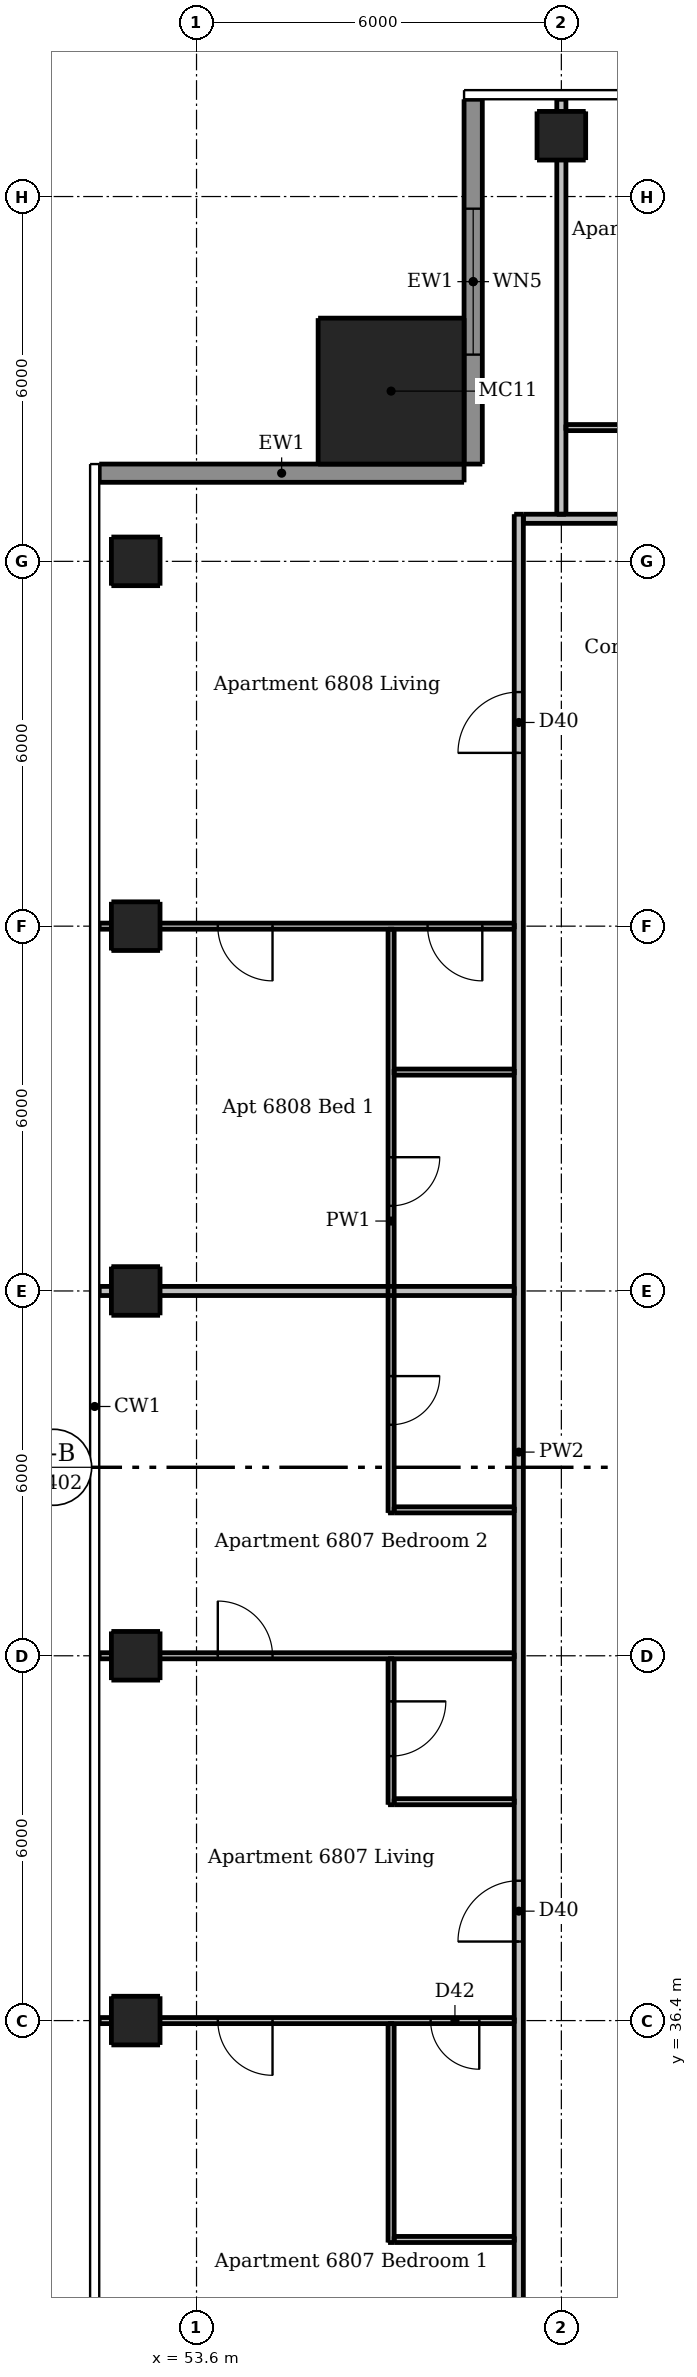
"""IFC4 building model, lengths in metres.
Left out: names, types, materials, properties, quantities, classifications, styles, units other than length and angle.
Written with IfcOpenShell. Run it as: python <this file> out.ifc"""

import sys

from ifc_helpers import new_model, si_unit, direction, frame, frame_2d, origin, origin_2d, place, context, subcontext, project, spatial, rectangle, extrude, element, fill, save


model = new_model("IFC4")
c1 = context("Model", 3, precision=1e-05, world=origin(), true_north=direction((0.0, 1.0)))
c2 = subcontext(c1, "Body", "Model", "MODEL_VIEW")
j1 = project(units=[si_unit("LENGTHUNIT", "METRE"), si_unit("PLANEANGLEUNIT", "RADIAN")], contexts=[c1])
p1 = place(None, origin())
s1 = spatial("IfcSite", under=j1, at=p1, CompositionType="ELEMENT")
p2 = place(p1, origin())
s2 = spatial("IfcBuilding", under=s1, at=p2, CompositionType="ELEMENT")
p3 = place(p2, frame((0.0, 0.0, 255.4)))
s3 = spatial("IfcBuildingStorey", under=s2, at=p3, CompositionType="ELEMENT", Elevation=255.4)
for number, where, z_axis, x_axis in (
    (1, (59.6, 67.4, 0.0), (0.0, 0.0, 1.0), (1.0, 0.0, 0.0)),
    (2, (52.6, 36.4, 0.0), (0.0, 0.0, 1.0), (1.0, 0.0, 0.0)),
    (3, (52.6, 42.4, 0.0), (0.0, 0.0, 1.0), (1.0, 0.0, 0.0)),
    (4, (52.6, 48.4, 0.0), (0.0, 0.0, 1.0), (1.0, 0.0, 0.0)),
    (5, (52.6, 54.4, 0.0), (0.0, 0.0, 1.0), (1.0, 0.0, 0.0)),
    (6, (52.6, 60.4, 0.0), (0.0, 0.0, 1.0), (1.0, 0.0, 0.0)),
):
    element("IfcColumn", number, at=place(p3, frame(where, z_axis=z_axis, x_axis=x_axis)), inside=s3, PredefinedType="COLUMN", context=c2, shape_type="SweptSolid", body=[
        extrude(rectangle(XDim=0.8, YDim=0.8, at=origin_2d()), origin(), (0.0, 0.0, 1.0), 3.05),
    ])
p4 = place(p3, frame((56.8, 63.2, 0.0), z_axis=(0.0, 0.0, 1.0), x_axis=(1.0, 0.0, 0.0)))
e7 = element("IfcColumn", 7, at=p4, inside=s3, PredefinedType="COLUMN", context=c2, shape_type="SweptSolid", body=[
    extrude(rectangle(XDim=2.4, YDim=2.4, at=origin_2d()), origin(), (0.0, 0.0, 1.0), 3.3),
])
p5 = place(p3, frame((58.15, 68.0, 0.0), z_axis=(0.0, 0.0, 1.0), x_axis=(0.0, -1.0, 0.0)))
e8 = element("IfcWall", 8, at=p5, inside=s3, PredefinedType="SOLIDWALL", context=c2, shape_type="SweptSolid", body=[
    extrude(rectangle(XDim=6.0, YDim=0.3, at=frame_2d((3.0, 0.0))), origin(), (0.0, 0.0, 1.0), 3.05),
])
p6 = place(p5, frame((1.8, 0.0, 0.15)))
e9 = element("IfcOpeningElement", 9, at=p6, cuts=e8, PredefinedType="OPENING", context=c2, shape_type="SweptSolid", body=[
    extrude(rectangle(XDim=2.4, YDim=2.1, at=frame_2d((1.2, 1.05))), frame((0.0, 0.16, 0.0), z_axis=(0.0, -1.0, 0.0), x_axis=(1.0, 0.0, 0.0)), (0.0, 0.0, 1.0), 0.32),
])
p7 = place(p3, frame((58.0, 61.85, 0.0), z_axis=(0.0, 0.0, 1.0), x_axis=(-1.0, 0.0, 0.0)))
e10 = element("IfcWall", 10, at=p7, inside=s3, PredefinedType="SOLIDWALL", context=c2, shape_type="SweptSolid", body=[
    extrude(rectangle(XDim=6.0, YDim=0.3, at=frame_2d((3.0, 0.0))), origin(), (0.0, 0.0, 1.0), 3.05),
])
p8 = place(p3, frame((56.8, 32.75, 0.0), z_axis=(0.0, 0.0, 1.0), x_axis=(0.0, 1.0, 0.0)))
e11 = element("IfcWall", 11, at=p8, inside=s3, PredefinedType="PARTITIONING", context=c2, shape_type="SweptSolid", body=[
    extrude(rectangle(XDim=3.6, YDim=0.1, at=frame_2d((1.8, 0.0))), origin(), (0.0, 0.0, 1.0), 3.05),
])
p9 = place(p3, frame((56.8, 42.35, 0.0), z_axis=(0.0, 0.0, 1.0), x_axis=(0.0, -1.0, 0.0)))
e12 = element("IfcWall", 12, at=p9, inside=s3, PredefinedType="PARTITIONING", context=c2, shape_type="SweptSolid", body=[
    extrude(rectangle(XDim=2.4, YDim=0.1, at=frame_2d((1.2, 0.0))), origin(), (0.0, 0.0, 1.0), 3.05),
])
p10 = place(p9, frame((0.7, 0.0, 0.0)))
e13 = element("IfcOpeningElement", 13, at=p10, cuts=e12, PredefinedType="OPENING", context=c2, shape_type="SweptSolid", body=[
    extrude(rectangle(XDim=0.9, YDim=2.1, at=frame_2d((0.45, 1.05))), frame((0.0, 0.06, 0.0), z_axis=(0.0, -1.0, 0.0), x_axis=(1.0, 0.0, 0.0)), (0.0, 0.0, 1.0), 0.12),
])
p11 = place(p3, frame((56.8, 54.35, 0.0), z_axis=(0.0, 0.0, 1.0), x_axis=(0.0, -1.0, 0.0)))
e14 = element("IfcWall", 14, at=p11, inside=s3, PredefinedType="PARTITIONING", context=c2, shape_type="SweptSolid", body=[
    extrude(rectangle(XDim=9.6, YDim=0.1, at=frame_2d((4.8, 0.0))), origin(), (0.0, 0.0, 1.0), 3.05),
])
p12 = place(p11, frame((7.35, 0.0, 0.0)))
e15 = element("IfcOpeningElement", 15, at=p12, cuts=e14, PredefinedType="OPENING", context=c2, shape_type="SweptSolid", body=[
    extrude(rectangle(XDim=0.8, YDim=2.1, at=frame_2d((0.4, 1.05))), frame((0.0, 0.06, 0.0), z_axis=(0.0, -1.0, 0.0), x_axis=(1.0, 0.0, 0.0)), (0.0, 0.0, 1.0), 0.12),
])
p13 = place(p11, frame((3.75, 0.0, 0.0)))
e16 = element("IfcOpeningElement", 16, at=p13, cuts=e14, PredefinedType="OPENING", context=c2, shape_type="SweptSolid", body=[
    extrude(rectangle(XDim=0.8, YDim=2.1, at=frame_2d((0.4, 1.05))), frame((0.0, 0.06, 0.0), z_axis=(0.0, -1.0, 0.0), x_axis=(1.0, 0.0, 0.0)), (0.0, 0.0, 1.0), 0.12),
])
p14 = place(p3, frame((59.675, 62.6, 0.0), z_axis=(0.0, 0.0, 1.0), x_axis=(1.0, 0.0, 0.0)))
e17 = element("IfcWall", 17, at=p14, inside=s3, PredefinedType="PARTITIONING", context=c2, shape_type="SweptSolid", body=[
    extrude(rectangle(XDim=17.85, YDim=0.1, at=frame_2d((8.925, 0.0))), origin(), (0.0, 0.0, 1.0), 3.05),
])
p15 = place(p14, frame((12.375, 0.0, 0.0)))
e18 = element("IfcOpeningElement", 18, at=p15, cuts=e17, PredefinedType="OPENING", context=c2, shape_type="SweptSolid", body=[
    extrude(rectangle(XDim=0.9, YDim=2.1, at=frame_2d((0.45, 1.05))), frame((0.0, 0.06, 0.0), z_axis=(0.0, -1.0, 0.0), x_axis=(1.0, 0.0, 0.0)), (0.0, 0.0, 1.0), 0.12),
])
p16 = place(p14, frame((16.275, 0.0, 0.0)))
e19 = element("IfcOpeningElement", 19, at=p16, cuts=e17, PredefinedType="OPENING", context=c2, shape_type="SweptSolid", body=[
    extrude(rectangle(XDim=0.9, YDim=2.1, at=frame_2d((0.45, 1.05))), frame((0.0, 0.06, 0.0), z_axis=(0.0, -1.0, 0.0), x_axis=(1.0, 0.0, 0.0)), (0.0, 0.0, 1.0), 0.12),
])
p17 = place(p14, frame((14.175, 0.0, 0.0)))
e20 = element("IfcOpeningElement", 20, at=p17, cuts=e17, PredefinedType="OPENING", context=c2, shape_type="SweptSolid", body=[
    extrude(rectangle(XDim=0.9, YDim=2.1, at=frame_2d((0.45, 1.05))), frame((0.0, 0.06, 0.0), z_axis=(0.0, -1.0, 0.0), x_axis=(1.0, 0.0, 0.0)), (0.0, 0.0, 1.0), 0.12),
])
p18 = place(p14, frame((1.275, 0.0, 0.0)))
e21 = element("IfcOpeningElement", 21, at=p18, cuts=e17, PredefinedType="OPENING", context=c2, shape_type="SweptSolid", body=[
    extrude(rectangle(XDim=0.9, YDim=2.1, at=frame_2d((0.45, 1.05))), frame((0.0, 0.06, 0.0), z_axis=(0.0, -1.0, 0.0), x_axis=(1.0, 0.0, 0.0)), (0.0, 0.0, 1.0), 0.12),
])
p19 = place(p14, frame((7.275, 0.0, 0.0)))
e22 = element("IfcOpeningElement", 22, at=p19, cuts=e17, PredefinedType="OPENING", context=c2, shape_type="SweptSolid", body=[
    extrude(rectangle(XDim=0.9, YDim=2.1, at=frame_2d((0.45, 1.05))), frame((0.0, 0.06, 0.0), z_axis=(0.0, -1.0, 0.0), x_axis=(1.0, 0.0, 0.0)), (0.0, 0.0, 1.0), 0.12),
])
p20 = place(p14, frame((4.325, 0.0, 0.0)))
e23 = element("IfcOpeningElement", 23, at=p20, cuts=e17, PredefinedType="OPENING", context=c2, shape_type="SweptSolid", body=[
    extrude(rectangle(XDim=0.8, YDim=2.1, at=frame_2d((0.4, 1.05))), frame((0.0, 0.06, 0.0), z_axis=(0.0, -1.0, 0.0), x_axis=(1.0, 0.0, 0.0)), (0.0, 0.0, 1.0), 0.12),
])
p21 = place(p14, frame((10.325, 0.0, 0.0)))
e24 = element("IfcOpeningElement", 24, at=p21, cuts=e17, PredefinedType="OPENING", context=c2, shape_type="SweptSolid", body=[
    extrude(rectangle(XDim=0.8, YDim=2.1, at=frame_2d((0.4, 1.05))), frame((0.0, 0.06, 0.0), z_axis=(0.0, -1.0, 0.0), x_axis=(1.0, 0.0, 0.0)), (0.0, 0.0, 1.0), 0.12),
])
p22 = place(p3, frame((58.825, 54.4, 0.0), z_axis=(0.0, 0.0, 1.0), x_axis=(-1.0, 0.0, 0.0)))
e25 = element("IfcWall", 25, at=p22, inside=s3, PredefinedType="PARTITIONING", context=c2, shape_type="SweptSolid", body=[
    extrude(rectangle(XDim=6.825, YDim=0.1, at=frame_2d((3.413, 0.0))), origin(), (0.0, 0.0, 1.0), 2.516),
])
p23 = place(p22, frame((0.525, 0.0, 0.0)))
e26 = element("IfcOpeningElement", 26, at=p23, cuts=e25, PredefinedType="OPENING", context=c2, shape_type="SweptSolid", body=[
    extrude(rectangle(XDim=0.9, YDim=2.1, at=frame_2d((0.45, 1.05))), frame((0.0, 0.06, 0.0), z_axis=(0.0, -1.0, 0.0), x_axis=(1.0, 0.0, 0.0)), (0.0, 0.0, 1.0), 0.12),
])
p24 = place(p22, frame((3.975, 0.0, 0.0)))
e27 = element("IfcOpeningElement", 27, at=p24, cuts=e25, PredefinedType="OPENING", context=c2, shape_type="SweptSolid", body=[
    extrude(rectangle(XDim=0.9, YDim=2.1, at=frame_2d((0.45, 1.05))), frame((0.0, 0.06, 0.0), z_axis=(0.0, -1.0, 0.0), x_axis=(1.0, 0.0, 0.0)), (0.0, 0.0, 1.0), 0.12),
])
for number, where, z_axis, x_axis in (
    (28, (56.85, 52.0, 0.0), (0.0, 0.0, 1.0), (1.0, 0.0, 0.0)),
    (29, (56.85, 44.8, 0.0), (0.0, 0.0, 1.0), (1.0, 0.0, 0.0)),
):
    element("IfcWall", number, at=place(p3, frame(where, z_axis=z_axis, x_axis=x_axis)), inside=s3, PredefinedType="PARTITIONING", context=c2, shape_type="SweptSolid", body=[
        extrude(rectangle(XDim=1.975, YDim=0.1, at=frame_2d((0.987, 0.0))), origin(), (0.0, 0.0, 1.0), 3.05),
    ])
p25 = place(p3, frame((52.0, 42.4, 0.0), z_axis=(0.0, 0.0, 1.0), x_axis=(1.0, 0.0, 0.0)))
e30 = element("IfcWall", 30, at=p25, inside=s3, PredefinedType="PARTITIONING", context=c2, shape_type="SweptSolid", body=[
    extrude(rectangle(XDim=6.825, YDim=0.1, at=frame_2d((3.413, 0.0))), origin(), (0.0, 0.0, 1.0), 2.516),
])
p26 = place(p25, frame((1.95, 0.0, 0.0)))
e31 = element("IfcOpeningElement", 31, at=p26, cuts=e30, PredefinedType="OPENING", context=c2, shape_type="SweptSolid", body=[
    extrude(rectangle(XDim=0.9, YDim=2.1, at=frame_2d((0.45, 1.05))), frame((0.0, 0.06, 0.0), z_axis=(0.0, -1.0, 0.0), x_axis=(1.0, 0.0, 0.0)), (0.0, 0.0, 1.0), 0.12),
])
p27 = place(p3, frame((56.85, 40.0, 0.0), z_axis=(0.0, 0.0, 1.0), x_axis=(1.0, 0.0, 0.0)))
e32 = element("IfcWall", 32, at=p27, inside=s3, PredefinedType="PARTITIONING", context=c2, shape_type="SweptSolid", body=[
    extrude(rectangle(XDim=1.975, YDim=0.1, at=frame_2d((0.987, 0.0))), origin(), (0.0, 0.0, 1.0), 3.05),
])
p28 = place(p3, frame((58.825, 36.4, 0.0), z_axis=(0.0, 0.0, 1.0), x_axis=(-1.0, 0.0, 0.0)))
e33 = element("IfcWall", 33, at=p28, inside=s3, PredefinedType="PARTITIONING", context=c2, shape_type="SweptSolid", body=[
    extrude(rectangle(XDim=6.825, YDim=0.1, at=frame_2d((3.413, 0.0))), origin(), (0.0, 0.0, 1.0), 2.516),
])
p29 = place(p28, frame((3.975, 0.0, 0.0)))
e34 = element("IfcOpeningElement", 34, at=p29, cuts=e33, PredefinedType="OPENING", context=c2, shape_type="SweptSolid", body=[
    extrude(rectangle(XDim=0.9, YDim=2.1, at=frame_2d((0.45, 1.05))), frame((0.0, 0.06, 0.0), z_axis=(0.0, -1.0, 0.0), x_axis=(1.0, 0.0, 0.0)), (0.0, 0.0, 1.0), 0.12),
])
p30 = place(p28, frame((0.575, 0.0, 0.0)))
e35 = element("IfcOpeningElement", 35, at=p30, cuts=e33, PredefinedType="OPENING", context=c2, shape_type="SweptSolid", body=[
    extrude(rectangle(XDim=0.8, YDim=2.1, at=frame_2d((0.4, 1.05))), frame((0.0, 0.06, 0.0), z_axis=(0.0, -1.0, 0.0), x_axis=(1.0, 0.0, 0.0)), (0.0, 0.0, 1.0), 0.12),
])
p31 = place(p3, frame((56.85, 32.8, 0.0), z_axis=(0.0, 0.0, 1.0), x_axis=(1.0, 0.0, 0.0)))
e36 = element("IfcWall", 36, at=p31, inside=s3, PredefinedType="PARTITIONING", context=c2, shape_type="SweptSolid", body=[
    extrude(rectangle(XDim=1.975, YDim=0.1, at=frame_2d((0.987, 0.0))), origin(), (0.0, 0.0, 1.0), 3.05),
])
p32 = place(p3, frame((58.9, 30.325, 0.0), z_axis=(0.0, 0.0, 1.0), x_axis=(0.0, 1.0, 0.0)))
e37 = element("IfcWall", 37, at=p32, inside=s3, PredefinedType="PARTITIONING", context=c2, shape_type="SweptSolid", body=[
    extrude(rectangle(XDim=30.85, YDim=0.15, at=frame_2d((15.425, 0.0))), origin(), (0.0, 0.0, 1.0), 3.05),
])
p33 = place(p32, frame((7.375, 0.0, 0.0)))
e38 = element("IfcOpeningElement", 38, at=p33, cuts=e37, PredefinedType="OPENING", context=c2, shape_type="SweptSolid", body=[
    extrude(rectangle(XDim=1.0, YDim=2.1, at=frame_2d((0.5, 1.05))), frame((0.0, 0.085, 0.0), z_axis=(0.0, -1.0, 0.0), x_axis=(1.0, 0.0, 0.0)), (0.0, 0.0, 1.0), 0.17),
])
p34 = place(p32, frame((26.925, 0.0, 0.0)))
e39 = element("IfcOpeningElement", 39, at=p34, cuts=e37, PredefinedType="OPENING", context=c2, shape_type="SweptSolid", body=[
    extrude(rectangle(XDim=1.0, YDim=2.1, at=frame_2d((0.5, 1.05))), frame((0.0, 0.085, 0.0), z_axis=(0.0, -1.0, 0.0), x_axis=(1.0, 0.0, 0.0)), (0.0, 0.0, 1.0), 0.17),
])
p35 = place(p3, frame((59.6, 61.175, 0.0), z_axis=(0.0, 0.0, 1.0), x_axis=(0.0, 1.0, 0.0)))
e40 = element("IfcWall", 40, at=p35, inside=s3, PredefinedType="PARTITIONING", context=c2, shape_type="SweptSolid", body=[
    extrude(rectangle(XDim=6.825, YDim=0.15, at=frame_2d((3.413, 0.0))), origin(), (0.0, 0.0, 1.0), 2.51),
])
p36 = place(p3, frame((58.975, 61.1, 0.0), z_axis=(0.0, 0.0, 1.0), x_axis=(1.0, 0.0, 0.0)))
e41 = element("IfcWall", 41, at=p36, inside=s3, PredefinedType="PARTITIONING", context=c2, shape_type="SweptSolid", body=[
    extrude(rectangle(XDim=29.25, YDim=0.15, at=frame_2d((14.625, 0.0))), origin(), (0.0, 0.0, 1.0), 3.05),
])
p37 = place(p36, frame((9.125, 0.0, 0.0)))
e42 = element("IfcOpeningElement", 42, at=p37, cuts=e41, PredefinedType="OPENING", context=c2, shape_type="SweptSolid", body=[
    extrude(rectangle(XDim=1.0, YDim=2.1, at=frame_2d((0.5, 1.05))), frame((0.0, 0.085, 0.0), z_axis=(0.0, -1.0, 0.0), x_axis=(1.0, 0.0, 0.0)), (0.0, 0.0, 1.0), 0.17),
])
p38 = place(p36, frame((26.475, 0.0, 0.0)))
e43 = element("IfcOpeningElement", 43, at=p38, cuts=e41, PredefinedType="OPENING", context=c2, shape_type="SweptSolid", body=[
    extrude(rectangle(XDim=1.0, YDim=2.1, at=frame_2d((0.5, 1.05))), frame((0.0, 0.085, 0.0), z_axis=(0.0, -1.0, 0.0), x_axis=(1.0, 0.0, 0.0)), (0.0, 0.0, 1.0), 0.17),
])
p39 = place(p3, frame((52.0, 48.4, 0.0), z_axis=(0.0, 0.0, 1.0), x_axis=(1.0, 0.0, 0.0)))
e44 = element("IfcWall", 44, at=p39, inside=s3, PredefinedType="PARTITIONING", context=c2, shape_type="SweptSolid", body=[
    extrude(rectangle(XDim=6.825, YDim=0.15, at=frame_2d((3.413, 0.0))), origin(), (0.0, 0.0, 1.0), 2.516),
])
p40 = place(p6, origin())
e45 = element("IfcWindow", 45, at=p40, inside=s3, PartitioningType="DOUBLE_PANEL_VERTICAL", PredefinedType="WINDOW", context=c2, shape_type="SweptSolid", body=[
    extrude(rectangle(XDim=2.4, YDim=2.1, at=frame_2d((1.2, 1.05))), frame((0.0, 0.03, 0.0), z_axis=(0.0, -1.0, 0.0), x_axis=(1.0, 0.0, 0.0)), (0.0, 0.0, 1.0), 0.06),
])
fill(e9, e45)
p41 = place(p33, origin())
e46 = element("IfcDoor", 46, at=p41, inside=s3, OperationType="SINGLE_SWING_LEFT", PredefinedType="DOOR", context=c2, shape_type="SweptSolid", body=[
    extrude(rectangle(XDim=1.0, YDim=2.1, at=frame_2d((0.5, 1.05))), frame((0.0, 0.025, 0.0), z_axis=(0.0, -1.0, 0.0), x_axis=(1.0, 0.0, 0.0)), (0.0, 0.0, 1.0), 0.05),
])
fill(e38, e46)
p42 = place(p10, origin())
e47 = element("IfcDoor", 47, at=p42, inside=s3, OperationType="SINGLE_SWING_LEFT", PredefinedType="DOOR", context=c2, shape_type="SweptSolid", body=[
    extrude(rectangle(XDim=0.9, YDim=2.1, at=frame_2d((0.45, 1.05))), frame((0.0, 0.025, 0.0), z_axis=(0.0, -1.0, 0.0), x_axis=(1.0, 0.0, 0.0)), (0.0, 0.0, 1.0), 0.05),
])
fill(e13, e47)
p43 = place(p29, origin())
e48 = element("IfcDoor", 48, at=p43, inside=s3, OperationType="SINGLE_SWING_LEFT", PredefinedType="DOOR", context=c2, shape_type="SweptSolid", body=[
    extrude(rectangle(XDim=0.9, YDim=2.1, at=frame_2d((0.45, 1.05))), frame((0.0, 0.025, 0.0), z_axis=(0.0, -1.0, 0.0), x_axis=(1.0, 0.0, 0.0)), (0.0, 0.0, 1.0), 0.05),
])
fill(e34, e48)
p44 = place(p30, origin())
e49 = element("IfcDoor", 49, at=p44, inside=s3, OperationType="SINGLE_SWING_LEFT", PredefinedType="DOOR", context=c2, shape_type="SweptSolid", body=[
    extrude(rectangle(XDim=0.8, YDim=2.1, at=frame_2d((0.4, 1.05))), frame((0.0, 0.025, 0.0), z_axis=(0.0, -1.0, 0.0), x_axis=(1.0, 0.0, 0.0)), (0.0, 0.0, 1.0), 0.05),
])
fill(e35, e49)
p45 = place(p26, origin())
e50 = element("IfcDoor", 50, at=p45, inside=s3, OperationType="SINGLE_SWING_LEFT", PredefinedType="DOOR", context=c2, shape_type="SweptSolid", body=[
    extrude(rectangle(XDim=0.9, YDim=2.1, at=frame_2d((0.45, 1.05))), frame((0.0, 0.025, 0.0), z_axis=(0.0, -1.0, 0.0), x_axis=(1.0, 0.0, 0.0)), (0.0, 0.0, 1.0), 0.05),
])
fill(e31, e50)
p46 = place(p12, origin())
e51 = element("IfcDoor", 51, at=p46, inside=s3, OperationType="SINGLE_SWING_LEFT", PredefinedType="DOOR", context=c2, shape_type="SweptSolid", body=[
    extrude(rectangle(XDim=0.8, YDim=2.1, at=frame_2d((0.4, 1.05))), frame((0.0, 0.025, 0.0), z_axis=(0.0, -1.0, 0.0), x_axis=(1.0, 0.0, 0.0)), (0.0, 0.0, 1.0), 0.05),
])
fill(e15, e51)
p47 = place(p34, origin())
e52 = element("IfcDoor", 52, at=p47, inside=s3, OperationType="SINGLE_SWING_LEFT", PredefinedType="DOOR", context=c2, shape_type="SweptSolid", body=[
    extrude(rectangle(XDim=1.0, YDim=2.1, at=frame_2d((0.5, 1.05))), frame((0.0, 0.025, 0.0), z_axis=(0.0, -1.0, 0.0), x_axis=(1.0, 0.0, 0.0)), (0.0, 0.0, 1.0), 0.05),
])
fill(e39, e52)
p48 = place(p23, origin())
e53 = element("IfcDoor", 53, at=p48, inside=s3, OperationType="SINGLE_SWING_LEFT", PredefinedType="DOOR", context=c2, shape_type="SweptSolid", body=[
    extrude(rectangle(XDim=0.9, YDim=2.1, at=frame_2d((0.45, 1.05))), frame((0.0, 0.025, 0.0), z_axis=(0.0, -1.0, 0.0), x_axis=(1.0, 0.0, 0.0)), (0.0, 0.0, 1.0), 0.05),
])
fill(e26, e53)
p49 = place(p24, origin())
e54 = element("IfcDoor", 54, at=p49, inside=s3, OperationType="SINGLE_SWING_LEFT", PredefinedType="DOOR", context=c2, shape_type="SweptSolid", body=[
    extrude(rectangle(XDim=0.9, YDim=2.1, at=frame_2d((0.45, 1.05))), frame((0.0, 0.025, 0.0), z_axis=(0.0, -1.0, 0.0), x_axis=(1.0, 0.0, 0.0)), (0.0, 0.0, 1.0), 0.05),
])
fill(e27, e54)
p50 = place(p13, origin())
e55 = element("IfcDoor", 55, at=p50, inside=s3, OperationType="SINGLE_SWING_LEFT", PredefinedType="DOOR", context=c2, shape_type="SweptSolid", body=[
    extrude(rectangle(XDim=0.8, YDim=2.1, at=frame_2d((0.4, 1.05))), frame((0.0, 0.025, 0.0), z_axis=(0.0, -1.0, 0.0), x_axis=(1.0, 0.0, 0.0)), (0.0, 0.0, 1.0), 0.05),
])
fill(e16, e55)
save(model, sys.argv[1])
